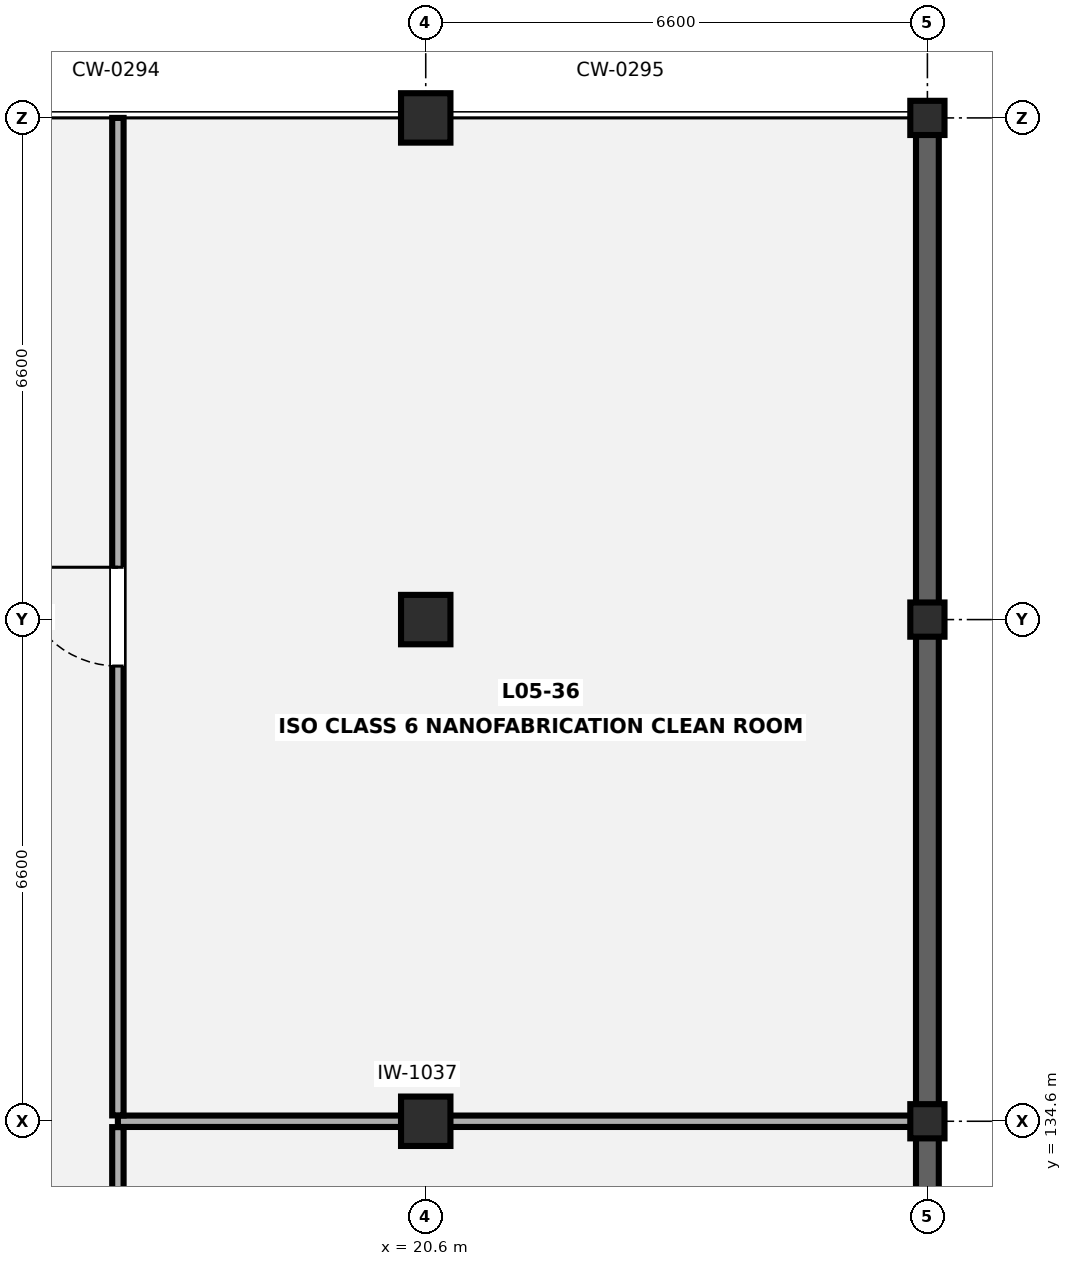
"""IFC4 building model, lengths in metres.
Left out: names, types, materials, properties, quantities, classifications, styles, units other than length and angle.
Written with IfcOpenShell. Run it as: python <this file> out.ifc"""

import sys

from ifc_helpers import new_model, si_unit, direction, frame, frame_2d, origin, origin_2d, place, context, subcontext, project, spatial, rectangle, extrude, element, fill, save


model = new_model("IFC4")
c1 = context("Model", 3, precision=1e-05, world=origin(), true_north=direction((0.0, 1.0)))
c2 = subcontext(c1, "Body", "Model", "MODEL_VIEW")
j1 = project(units=[si_unit("LENGTHUNIT", "METRE"), si_unit("PLANEANGLEUNIT", "RADIAN")], contexts=[c1])
p1 = place(None, origin())
s1 = spatial("IfcSite", under=j1, at=p1, CompositionType="ELEMENT")
p2 = place(p1, origin())
s2 = spatial("IfcBuilding", under=s1, at=p2, CompositionType="ELEMENT")
p3 = place(p2, frame((0.0, 0.0, 21.7)))
s3 = spatial("IfcBuildingStorey", under=s2, at=p3, CompositionType="ELEMENT", Elevation=21.7)
for number, where, z_axis, x_axis in (
    (1, (20.6, 134.6, 0.0), (0.0, 0.0, 1.0), (1.0, 0.0, 0.0)),
    (2, (20.6, 141.2, 0.0), (0.0, 0.0, 1.0), (1.0, 0.0, 0.0)),
    (3, (20.6, 147.8, 0.0), (0.0, 0.0, 1.0), (1.0, 0.0, 0.0)),
):
    element("IfcColumn", number, at=place(p3, frame(where, z_axis=z_axis, x_axis=x_axis)), inside=s3, PredefinedType="COLUMN", context=c2, shape_type="SweptSolid", body=[
        extrude(rectangle(XDim=0.65, YDim=0.65, at=origin_2d()), origin(), (0.0, 0.0, 1.0), 3.92),
    ])
for number, where, z_axis, x_axis in (
    (4, (27.2, 134.6, 0.0), (0.0, 0.0, 1.0), (1.0, 0.0, 0.0)),
    (5, (27.2, 141.2, 0.0), (0.0, 0.0, 1.0), (1.0, 0.0, 0.0)),
    (6, (27.2, 147.8, 0.0), (0.0, 0.0, 1.0), (1.0, 0.0, 0.0)),
):
    element("IfcColumn", number, at=place(p3, frame(where, z_axis=z_axis, x_axis=x_axis)), inside=s3, PredefinedType="PILASTER", context=c2, shape_type="SweptSolid", body=[
        extrude(rectangle(XDim=0.45, YDim=0.45, at=origin_2d()), origin(), (0.0, 0.0, 1.0), 3.92),
    ])
p4 = place(p3, frame((27.2, 147.577, 0.0), z_axis=(0.0, 0.0, 1.0), x_axis=(0.0, -1.0, 0.0)))
e7 = element("IfcWall", 7, at=p4, inside=s3, PredefinedType="SOLIDWALL", context=c2, shape_type="SweptSolid", body=[
    extrude(rectangle(XDim=52.354, YDim=0.3, at=frame_2d((26.177, 0.0))), origin(), (0.0, 0.0, 1.0), 3.84),
])
p5 = place(p3, frame((16.55, 134.6, 0.0), z_axis=(0.0, 0.0, 1.0), x_axis=(1.0, 0.0, 0.0)))
e8 = element("IfcWall", 8, at=p5, inside=s3, PredefinedType="PARTITIONING", context=c2, shape_type="SweptSolid", body=[
    extrude(rectangle(XDim=10.65, YDim=0.15, at=frame_2d((5.325, 0.0))), origin(), (0.0, 0.0, 1.0), 2.435),
])
p6 = place(p3, frame((16.55, 121.477, 0.0), z_axis=(0.0, 0.0, 1.0), x_axis=(0.0, 1.0, 0.0)))
e9 = element("IfcWall", 9, at=p6, inside=s3, PredefinedType="PARTITIONING", context=c2, shape_type="SweptSolid", body=[
    extrude(rectangle(XDim=13.046, YDim=0.15, at=frame_2d((6.523, 0.0))), origin(), (0.0, 0.0, 1.0), 3.9),
])
p7 = place(p6, frame((5.873, 0.0, 0.0)))
e10 = element("IfcOpeningElement", 10, at=p7, cuts=e9, PredefinedType="OPENING", context=c2, shape_type="SweptSolid", body=[
    extrude(rectangle(XDim=1.3, YDim=2.2, at=frame_2d((0.65, 1.1))), frame((0.0, 0.085, 0.0), z_axis=(0.0, -1.0, 0.0), x_axis=(1.0, 0.0, 0.0)), (0.0, 0.0, 1.0), 0.17),
])
p8 = place(p3, frame((16.55, 134.677, 0.0), z_axis=(0.0, 0.0, 1.0), x_axis=(0.0, 1.0, 0.0)))
e11 = element("IfcWall", 11, at=p8, inside=s3, PredefinedType="PARTITIONING", context=c2, shape_type="SweptSolid", body=[
    extrude(rectangle(XDim=13.123, YDim=0.15, at=frame_2d((6.562, 0.0))), origin(), (0.0, 0.0, 1.0), 3.9),
])
p9 = place(p8, frame((5.912, 0.0, 0.0)))
e12 = element("IfcOpeningElement", 12, at=p9, cuts=e11, PredefinedType="OPENING", context=c2, shape_type="SweptSolid", body=[
    extrude(rectangle(XDim=1.3, YDim=2.2, at=frame_2d((0.65, 1.1))), frame((0.0, 0.085, 0.0), z_axis=(0.0, -1.0, 0.0), x_axis=(1.0, 0.0, 0.0)), (0.0, 0.0, 1.0), 0.17),
])
p10 = place(p9, origin())
e13 = element("IfcDoor", 13, at=p10, inside=s3, OperationType="SINGLE_SWING_RIGHT", PredefinedType="DOOR", context=c2, shape_type="SweptSolid", body=[
    extrude(rectangle(XDim=1.3, YDim=2.2, at=frame_2d((0.65, 1.1))), frame((0.0, 0.025, 0.0), z_axis=(0.0, -1.0, 0.0), x_axis=(1.0, 0.0, 0.0)), (0.0, 0.0, 1.0), 0.05),
])
fill(e12, e13)
save(model, sys.argv[1])
